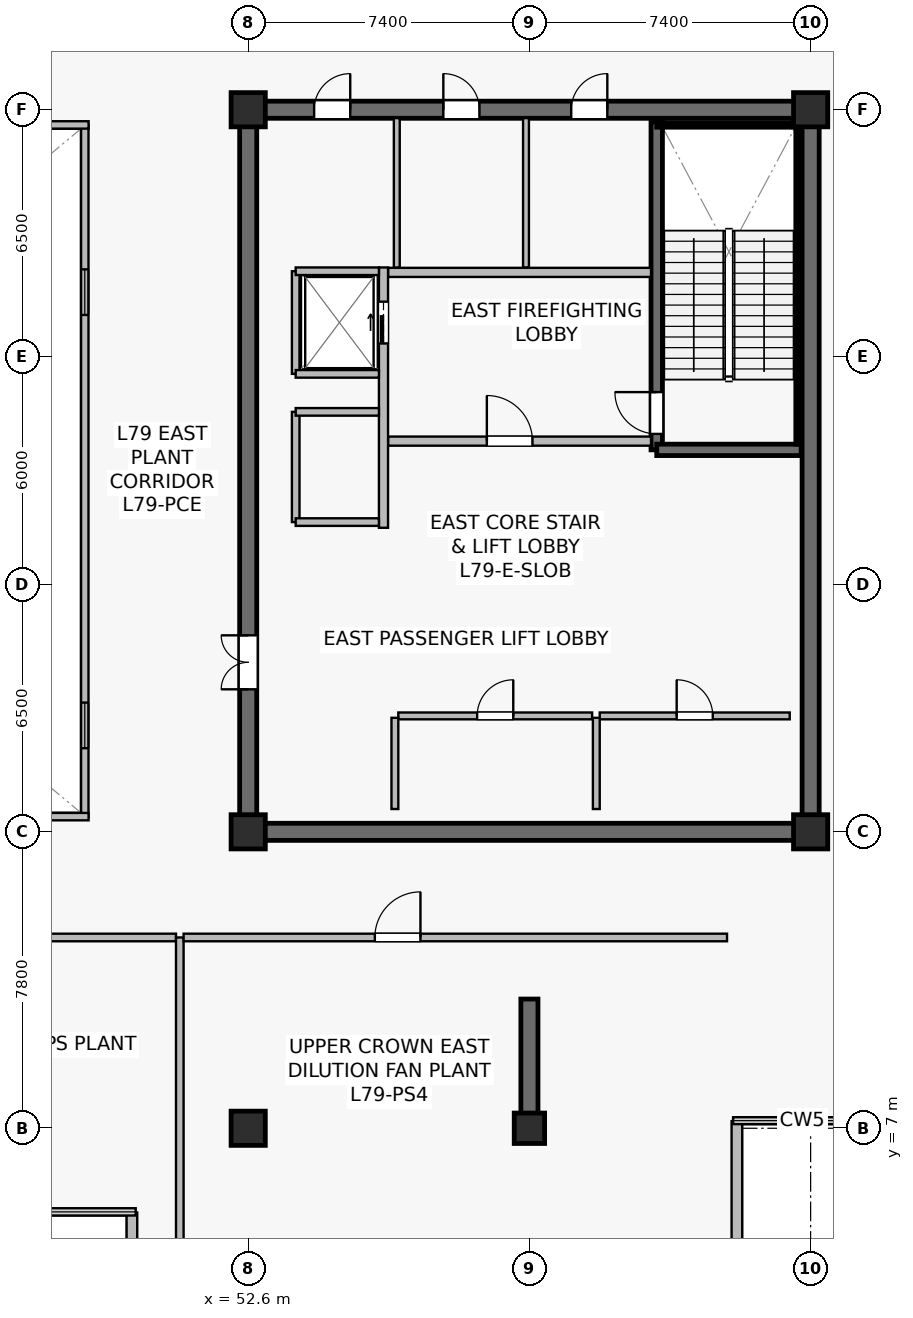
"""IFC4 building model, lengths in metres.
Left out: names, types, materials, properties, quantities, classifications, styles, units other than length and angle.
Written with IfcOpenShell. Run it as: python <this file> out.ifc"""

import sys

from ifc_helpers import new_model, si_unit, direction, frame, frame_2d, origin, origin_2d, place, context, subcontext, project, spatial, rectangle, extrude, source, transform, mapped, element, fill, save


model = new_model("IFC4")
c1 = context("Model", 3, precision=1e-05, world=origin(), true_north=direction((0.0, 1.0)))
c2 = subcontext(c1, "Body", "Model", "MODEL_VIEW")
j1 = project(units=[si_unit("LENGTHUNIT", "METRE"), si_unit("PLANEANGLEUNIT", "RADIAN")], contexts=[c1])
p1 = place(None, origin())
s1 = spatial("IfcSite", under=j1, at=p1, CompositionType="ELEMENT")
p2 = place(p1, origin())
s2 = spatial("IfcBuilding", under=s1, at=p2, CompositionType="ELEMENT")
p3 = place(p2, frame((0.0, 0.0, 332.4)))
s3 = spatial("IfcBuildingStorey", under=s2, at=p3, CompositionType="ELEMENT", Elevation=332.4)
p4 = place(p3, frame((52.375, 14.8, 0.0), z_axis=(0.0, 0.0, 1.0), x_axis=(1.0, 0.0, 0.0)))
e1 = element("IfcWall", 1, at=p4, inside=s3, PredefinedType="SHEAR", context=c2, shape_type="SweptSolid", body=[
    extrude(rectangle(XDim=15.25, YDim=0.45, at=frame_2d((7.625, 0.0))), origin(), (0.0, 0.0, 1.0), 5.12),
])
p5 = place(p3, frame((52.375, 33.8, 0.0), z_axis=(0.0, 0.0, 1.0), x_axis=(1.0, 0.0, 0.0)))
e2 = element("IfcWall", 2, at=p5, inside=s3, PredefinedType="SHEAR", context=c2, shape_type="SweptSolid", body=[
    extrude(rectangle(XDim=15.25, YDim=0.45, at=frame_2d((7.625, 0.0))), origin(), (0.0, 0.0, 1.0), 5.12),
])
p6 = place(p5, frame((8.725, 0.0, 0.0)))
e3 = element("IfcOpeningElement", 3, at=p6, cuts=e2, PredefinedType="OPENING", context=c2, shape_type="SweptSolid", body=[
    extrude(rectangle(XDim=0.95, YDim=2.15, at=frame_2d((0.475, 1.075))), frame((0.0, 0.235, 0.0), z_axis=(0.0, -1.0, 0.0), x_axis=(1.0, 0.0, 0.0)), (0.0, 0.0, 1.0), 0.47),
])
p7 = place(p5, frame((5.36, 0.0, 0.0)))
e4 = element("IfcOpeningElement", 4, at=p7, cuts=e2, PredefinedType="OPENING", context=c2, shape_type="SweptSolid", body=[
    extrude(rectangle(XDim=0.95, YDim=2.15, at=frame_2d((0.475, 1.075))), frame((0.0, 0.235, 0.0), z_axis=(0.0, -1.0, 0.0), x_axis=(1.0, 0.0, 0.0)), (0.0, 0.0, 1.0), 0.47),
])
p8 = place(p5, frame((1.96, 0.0, 0.0)))
e5 = element("IfcOpeningElement", 5, at=p8, cuts=e2, PredefinedType="OPENING", context=c2, shape_type="SweptSolid", body=[
    extrude(rectangle(XDim=0.95, YDim=2.15, at=frame_2d((0.475, 1.075))), frame((0.0, 0.235, 0.0), z_axis=(0.0, -1.0, 0.0), x_axis=(1.0, 0.0, 0.0)), (0.0, 0.0, 1.0), 0.47),
])
p9 = place(p3, frame((52.6, 15.025, 0.0), z_axis=(0.0, 0.0, 1.0), x_axis=(0.0, 1.0, 0.0)))
e6 = element("IfcWall", 6, at=p9, inside=s3, PredefinedType="SHEAR", context=c2, shape_type="SweptSolid", body=[
    extrude(rectangle(XDim=18.55, YDim=0.45, at=frame_2d((9.275, 0.0))), origin(), (0.0, 0.0, 1.0), 5.12),
])
p10 = place(p9, frame((3.525, 0.0, 0.0)))
e7 = element("IfcOpeningElement", 7, at=p10, cuts=e6, PredefinedType="OPENING", context=c2, shape_type="SweptSolid", body=[
    extrude(rectangle(XDim=1.42, YDim=2.2, at=frame_2d((0.71, 1.1))), frame((0.0, 0.235, 0.0), z_axis=(0.0, -1.0, 0.0), x_axis=(1.0, 0.0, 0.0)), (0.0, 0.0, 1.0), 0.47),
])
p11 = place(p3, frame((67.4, 15.025, 0.0), z_axis=(0.0, 0.0, 1.0), x_axis=(0.0, 1.0, 0.0)))
e8 = element("IfcWall", 8, at=p11, inside=s3, PredefinedType="SHEAR", context=c2, shape_type="SweptSolid", body=[
    extrude(rectangle(XDim=18.55, YDim=0.45, at=frame_2d((9.275, 0.0))), origin(), (0.0, 0.0, 1.0), 5.12),
])
p12 = place(p3, frame((63.35, 24.85, 0.0), z_axis=(0.0, 0.0, 1.0), x_axis=(0.0, 1.0, 0.0)))
e9 = element("IfcWall", 9, at=p12, inside=s3, PredefinedType="SHEAR", context=c2, shape_type="SweptSolid", body=[
    extrude(rectangle(XDim=8.63, YDim=0.3, at=frame_2d((4.315, 0.0))), origin(), (0.0, 0.0, 1.0), 5.12),
])
p13 = place(p12, frame((0.42, 0.0, 0.0)))
e10 = element("IfcOpeningElement", 10, at=p13, cuts=e9, PredefinedType="OPENING", context=c2, shape_type="SweptSolid", body=[
    extrude(rectangle(XDim=1.1, YDim=2.15, at=frame_2d((0.55, 1.075))), frame((0.0, 0.16, 0.0), z_axis=(0.0, -1.0, 0.0), x_axis=(1.0, 0.0, 0.0)), (0.0, 0.0, 1.0), 0.32),
])
p14 = place(p3, frame((63.35, 24.85, 0.0), z_axis=(0.0, 0.0, 1.0), x_axis=(1.0, 0.0, 0.0)))
e11 = element("IfcWall", 11, at=p14, inside=s3, PredefinedType="SHEAR", context=c2, shape_type="SweptSolid", body=[
    extrude(rectangle(XDim=3.8, YDim=0.3, at=frame_2d((1.9, 0.0))), origin(), (0.0, 0.0, 1.0), 5.12),
])
p15 = place(p3, frame((63.35, 33.4, 0.0), z_axis=(0.0, 0.0, 1.0), x_axis=(1.0, 0.0, 0.0)))
e12 = element("IfcWall", 12, at=p15, inside=s3, PredefinedType="SOLIDWALL", context=c2, shape_type="SweptSolid", body=[
    extrude(rectangle(XDim=3.72, YDim=0.12, at=frame_2d((1.86, 0.0))), origin(), (0.0, 0.0, 1.0), 5.12),
])
p16 = place(p3, frame((67.07, 25.0, 0.0), z_axis=(0.0, 0.0, 1.0), x_axis=(0.0, 1.0, 0.0)))
e13 = element("IfcWall", 13, at=p16, inside=s3, PredefinedType="SOLIDWALL", context=c2, shape_type="SweptSolid", body=[
    extrude(rectangle(XDim=8.32, YDim=0.12, at=frame_2d((4.16, 0.0))), origin(), (0.0, 0.0, 1.0), 5.12),
])
p17 = place(p3, frame((60.0, 7.3, 0.0), z_axis=(0.0, 0.0, 1.0), x_axis=(0.0, 1.0, 0.0)))
e14 = element("IfcWall", 14, at=p17, inside=s3, PredefinedType="SHEAR", context=c2, shape_type="SweptSolid", body=[
    extrude(rectangle(XDim=3.1, YDim=0.45, at=frame_2d((1.55, 0.0))), origin(), (0.0, 0.0, 1.0), 5.12),
])
m1 = source(origin(), c2, "Body", "SweptSolid", [
    extrude(rectangle(XDim=0.9, YDim=0.9, at=origin_2d()), origin(), (0.0, 0.0, 1.0), 5.4),
])
p18 = place(p3, frame((52.6, 7.0, 0.0), z_axis=(0.0, 0.0, 1.0), x_axis=(1.0, 0.0, 0.0)))
e15 = element("IfcColumn", 15, at=p18, inside=s3, PredefinedType="COLUMN", context=c2, shape_type="MappedRepresentation", body=[
    mapped(m1, transform((0.0, 0.0, 0.0), scale=1.0)),
])
m2 = source(origin(), c2, "Body", "SweptSolid", [
    extrude(rectangle(XDim=0.8, YDim=0.8, at=origin_2d()), origin(), (0.0, 0.0, 1.0), 5.4),
])
p19 = place(p3, frame((60.0, 7.0, 0.0), z_axis=(0.0, 0.0, 1.0), x_axis=(1.0, 0.0, 0.0)))
e16 = element("IfcColumn", 16, at=p19, inside=s3, PredefinedType="COLUMN", context=c2, shape_type="MappedRepresentation", body=[
    mapped(m2, transform((0.0, 0.0, 0.0), scale=1.0)),
])
for number, where, z_axis, x_axis in (
    (17, (52.6, 14.8, 0.0), (0.0, 0.0, 1.0), (1.0, 0.0, 0.0)),
    (18, (67.4, 14.8, 0.0), (0.0, 0.0, 1.0), (1.0, 0.0, 0.0)),
    (19, (52.6, 33.8, 0.0), (0.0, 0.0, 1.0), (1.0, 0.0, 0.0)),
    (20, (67.4, 33.8, 0.0), (0.0, 0.0, 1.0), (1.0, 0.0, 0.0)),
):
    element("IfcColumn", number, at=place(p3, frame(where, z_axis=z_axis, x_axis=x_axis)), inside=s3, PredefinedType="COLUMN", context=c2, shape_type="MappedRepresentation", body=[
        mapped(m1, transform((0.0, 0.0, 0.0), scale=1.0)),
    ])
p20 = place(p3, frame((49.54, 4.783, 0.0), z_axis=(0.0, 0.0, 1.0), x_axis=(0.0, -1.0, 0.0)))
e21 = element("IfcWall", 21, at=p20, inside=s3, PredefinedType="STANDARD", context=c2, shape_type="SweptSolid", body=[
    extrude(rectangle(XDim=1.083, YDim=0.28, at=frame_2d((0.542, 0.0))), origin(), (0.0, 0.0, 1.0), 5.12),
])
p21 = place(p3, frame((65.46, 3.7, 0.0), z_axis=(0.0, 0.0, 1.0), x_axis=(0.0, 1.0, 0.0)))
e22 = element("IfcWall", 22, at=p21, inside=s3, PredefinedType="STANDARD", context=c2, shape_type="SweptSolid", body=[
    extrude(rectangle(XDim=3.488, YDim=0.28, at=frame_2d((1.744, 0.0))), origin(), (0.0, 0.0, 1.0), 5.12),
])
p22 = place(p3, frame((56.28, 25.08, 0.0), z_axis=(0.0, 0.0, 1.0), x_axis=(1.0, 0.0, 0.0)))
e23 = element("IfcWall", 23, at=p22, inside=s3, PredefinedType="SOLIDWALL", context=c2, shape_type="SweptSolid", body=[
    extrude(rectangle(XDim=6.92, YDim=0.24, at=frame_2d((3.46, 0.0))), origin(), (0.0, 0.0, 1.0), 4.355),
])
p23 = place(p22, frame((2.6, 0.0, 0.0)))
e24 = element("IfcOpeningElement", 24, at=p23, cuts=e23, PredefinedType="OPENING", context=c2, shape_type="SweptSolid", body=[
    extrude(rectangle(XDim=1.2, YDim=2.16, at=frame_2d((0.6, 1.08))), frame((0.0, 0.13, 0.0), z_axis=(0.0, -1.0, 0.0), x_axis=(1.0, 0.0, 0.0)), (0.0, 0.0, 1.0), 0.26),
])
p24 = place(p3, frame((56.28, 29.52, 0.0), z_axis=(0.0, 0.0, 1.0), x_axis=(1.0, 0.0, 0.0)))
e25 = element("IfcWall", 25, at=p24, inside=s3, PredefinedType="SOLIDWALL", context=c2, shape_type="SweptSolid", body=[
    extrude(rectangle(XDim=6.92, YDim=0.24, at=frame_2d((3.46, 0.0))), origin(), (0.0, 0.0, 1.0), 4.355),
])
p25 = place(p3, frame((56.16, 22.8, 0.0), z_axis=(0.0, 0.0, 1.0), x_axis=(0.0, 1.0, 0.0)))
e26 = element("IfcWall", 26, at=p25, inside=s3, PredefinedType="SOLIDWALL", context=c2, shape_type="SweptSolid", body=[
    extrude(rectangle(XDim=6.85, YDim=0.24, at=frame_2d((3.425, 0.0))), origin(), (0.0, 0.0, 1.0), 4.255),
])
p26 = place(p25, frame((4.85, 0.0, 0.0)))
e27 = element("IfcOpeningElement", 27, at=p26, cuts=e26, PredefinedType="OPENING", context=c2, shape_type="SweptSolid", body=[
    extrude(rectangle(XDim=1.1, YDim=2.22, at=frame_2d((0.55, 1.11))), frame((0.0, 0.13, 0.0), z_axis=(0.0, -1.0, 0.0), x_axis=(1.0, 0.0, 0.0)), (0.0, 0.0, 1.0), 0.26),
])
p27 = place(p3, frame((53.85, 26.85, 0.0), z_axis=(0.0, 0.0, 1.0), x_axis=(0.0, 1.0, 0.0)))
e28 = element("IfcWall", 28, at=p27, inside=s3, PredefinedType="SOLIDWALL", context=c2, shape_type="SweptSolid", body=[
    extrude(rectangle(XDim=2.7, YDim=0.2, at=frame_2d((1.35, 0.0))), origin(), (0.0, 0.0, 1.0), 5.12),
])
p28 = place(p3, frame((53.85, 29.55, 0.0), z_axis=(0.0, 0.0, 1.0), x_axis=(1.0, 0.0, 0.0)))
e29 = element("IfcWall", 29, at=p28, inside=s3, PredefinedType="SOLIDWALL", context=c2, shape_type="SweptSolid", body=[
    extrude(rectangle(XDim=2.19, YDim=0.2, at=frame_2d((1.095, 0.0))), origin(), (0.0, 0.0, 1.0), 5.12),
])
p29 = place(p3, frame((53.85, 26.85, 0.0), z_axis=(0.0, 0.0, 1.0), x_axis=(1.0, 0.0, 0.0)))
e30 = element("IfcWall", 30, at=p29, inside=s3, PredefinedType="SOLIDWALL", context=c2, shape_type="SweptSolid", body=[
    extrude(rectangle(XDim=2.19, YDim=0.2, at=frame_2d((1.095, 0.0))), origin(), (0.0, 0.0, 1.0), 4.517),
])
p30 = place(p3, frame((53.85, 22.95, 0.0), z_axis=(0.0, 0.0, 1.0), x_axis=(0.0, 1.0, 0.0)))
e31 = element("IfcWall", 31, at=p30, inside=s3, PredefinedType="SOLIDWALL", context=c2, shape_type="SweptSolid", body=[
    extrude(rectangle(XDim=2.9, YDim=0.2, at=frame_2d((1.45, 0.0))), origin(), (0.0, 0.0, 1.0), 4.255),
])
for number, where, z_axis, x_axis in (
    (32, (53.85, 25.85, 0.0), (0.0, 0.0, 1.0), (1.0, 0.0, 0.0)),
    (33, (53.85, 22.95, 0.0), (0.0, 0.0, 1.0), (1.0, 0.0, 0.0)),
):
    element("IfcWall", number, at=place(p3, frame(where, z_axis=z_axis, x_axis=x_axis)), inside=s3, PredefinedType="SOLIDWALL", context=c2, shape_type="SweptSolid", body=[
        extrude(rectangle(XDim=2.19, YDim=0.2, at=frame_2d((1.095, 0.0))), origin(), (0.0, 0.0, 1.0), 5.12),
    ])
p31 = place(p3, frame((61.85, 17.85, 0.0), z_axis=(0.0, 0.0, 1.0), x_axis=(1.0, 0.0, 0.0)))
e34 = element("IfcWall", 34, at=p31, inside=s3, PredefinedType="SOLIDWALL", context=c2, shape_type="SweptSolid", body=[
    extrude(rectangle(XDim=5.0, YDim=0.18, at=frame_2d((2.5, 0.0))), origin(), (0.0, 0.0, 1.0), 5.12),
])
p32 = place(p31, frame((2.025, 0.0, 0.0)))
e35 = element("IfcOpeningElement", 35, at=p32, cuts=e34, PredefinedType="OPENING", context=c2, shape_type="SweptSolid", body=[
    extrude(rectangle(XDim=0.95, YDim=2.15, at=frame_2d((0.475, 1.075))), frame((0.0, 0.1, 0.0), z_axis=(0.0, -1.0, 0.0), x_axis=(1.0, 0.0, 0.0)), (0.0, 0.0, 1.0), 0.2),
])
p33 = place(p3, frame((61.76, 15.4, 0.0), z_axis=(0.0, 0.0, 1.0), x_axis=(0.0, 1.0, 0.0)))
e36 = element("IfcWall", 36, at=p33, inside=s3, PredefinedType="SOLIDWALL", context=c2, shape_type="SweptSolid", body=[
    extrude(rectangle(XDim=2.4, YDim=0.18, at=frame_2d((1.2, 0.0))), origin(), (0.0, 0.0, 1.0), 5.12),
])
p34 = place(p3, frame((56.55, 17.85, 0.0), z_axis=(0.0, 0.0, 1.0), x_axis=(1.0, 0.0, 0.0)))
e37 = element("IfcWall", 37, at=p34, inside=s3, PredefinedType="SOLIDWALL", context=c2, shape_type="SweptSolid", body=[
    extrude(rectangle(XDim=5.1, YDim=0.18, at=frame_2d((2.55, 0.0))), origin(), (0.0, 0.0, 1.0), 4.355),
])
p35 = place(p34, frame((2.075, 0.0, 0.0)))
e38 = element("IfcOpeningElement", 38, at=p35, cuts=e37, PredefinedType="OPENING", context=c2, shape_type="SweptSolid", body=[
    extrude(rectangle(XDim=0.95, YDim=2.15, at=frame_2d((0.475, 1.075))), frame((0.0, 0.1, 0.0), z_axis=(0.0, -1.0, 0.0), x_axis=(1.0, 0.0, 0.0)), (0.0, 0.0, 1.0), 0.2),
])
p36 = place(p3, frame((56.46, 15.4, 0.0), z_axis=(0.0, 0.0, 1.0), x_axis=(0.0, 1.0, 0.0)))
e39 = element("IfcWall", 39, at=p36, inside=s3, PredefinedType="SOLIDWALL", context=c2, shape_type="SweptSolid", body=[
    extrude(rectangle(XDim=2.4, YDim=0.18, at=frame_2d((1.2, 0.0))), origin(), (0.0, 0.0, 1.0), 5.12),
])
p37 = place(p3, frame((59.91, 29.65, 0.0), z_axis=(0.0, 0.0, 1.0), x_axis=(0.0, 1.0, 0.0)))
e40 = element("IfcWall", 40, at=p37, inside=s3, PredefinedType="PLUMBINGWALL", context=c2, shape_type="SweptSolid", body=[
    extrude(rectangle(XDim=3.93, YDim=0.155, at=frame_2d((1.965, 0.0))), origin(), (0.0, 0.0, 1.0), 4.355),
])
p38 = place(p3, frame((56.51, 29.65, 0.0), z_axis=(0.0, 0.0, 1.0), x_axis=(0.0, 1.0, 0.0)))
e41 = element("IfcWall", 41, at=p38, inside=s3, PredefinedType="PLUMBINGWALL", context=c2, shape_type="SweptSolid", body=[
    extrude(rectangle(XDim=3.93, YDim=0.155, at=frame_2d((1.965, 0.0))), origin(), (0.0, 0.0, 1.0), 5.12),
])
p39 = place(p3, frame((48.3, 15.2, 0.0), z_axis=(0.0, 0.0, 1.0), x_axis=(0.0, 1.0, 0.0)))
e42 = element("IfcWall", 42, at=p39, inside=s3, PredefinedType="SOLIDWALL", context=c2, shape_type="SweptSolid", body=[
    extrude(rectangle(XDim=18.2, YDim=0.195, at=frame_2d((9.1, 0.0))), origin(), (0.0, 0.0, 1.0), 5.12),
])
p40 = place(p39, frame((1.8, 0.0, 0.9)))
e43 = element("IfcOpeningElement", 43, at=p40, cuts=e42, PredefinedType="OPENING", context=c2, shape_type="SweptSolid", body=[
    extrude(rectangle(XDim=1.2, YDim=1.35, at=frame_2d((0.6, 0.675))), frame((0.0, 0.107, 0.0), z_axis=(0.0, -1.0, 0.0), x_axis=(1.0, 0.0, 0.0)), (0.0, 0.0, 1.0), 0.215),
])
p41 = place(p39, frame((13.2, 0.0, 0.9)))
e44 = element("IfcOpeningElement", 44, at=p41, cuts=e42, PredefinedType="OPENING", context=c2, shape_type="SweptSolid", body=[
    extrude(rectangle(XDim=1.2, YDim=1.35, at=frame_2d((0.6, 0.675))), frame((0.0, 0.107, 0.0), z_axis=(0.0, -1.0, 0.0), x_axis=(1.0, 0.0, 0.0)), (0.0, 0.0, 1.0), 0.215),
])
for number, where, z_axis, x_axis in (
    (45, (26.4, 15.2, 0.0), (0.0, 0.0, 1.0), (1.0, 0.0, 0.0)),
    (46, (26.4, 33.4, 0.0), (0.0, 0.0, 1.0), (1.0, 0.0, 0.0)),
):
    element("IfcWall", number, at=place(p3, frame(where, z_axis=z_axis, x_axis=x_axis)), inside=s3, PredefinedType="SOLIDWALL", context=c2, shape_type="SweptSolid", body=[
        extrude(rectangle(XDim=22.0, YDim=0.195, at=frame_2d((11.0, 0.0))), origin(), (0.0, 0.0, 1.0), 5.12),
    ])
p42 = place(p3, frame((39.1, 12.02, 0.0), z_axis=(0.0, 0.0, 1.0), x_axis=(1.0, 0.0, 0.0)))
e47 = element("IfcWall", 47, at=p42, inside=s3, PredefinedType="SOLIDWALL", context=c2, shape_type="SweptSolid", body=[
    extrude(rectangle(XDim=11.6, YDim=0.2, at=frame_2d((5.8, 0.0))), origin(), (0.0, 0.0, 1.0), 4.355),
])
p43 = place(p42, frame((5.2, 0.0, 0.0)))
e48 = element("IfcOpeningElement", 48, at=p43, cuts=e47, PredefinedType="OPENING", context=c2, shape_type="SweptSolid", body=[
    extrude(rectangle(XDim=1.2, YDim=2.16, at=frame_2d((0.6, 1.08))), frame((0.0, 0.11, 0.0), z_axis=(0.0, -1.0, 0.0), x_axis=(1.0, 0.0, 0.0)), (0.0, 0.0, 1.0), 0.22),
])
p44 = place(p3, frame((50.8, 3.81, 0.0), z_axis=(0.0, 0.0, 1.0), x_axis=(0.0, 1.0, 0.0)))
e49 = element("IfcWall", 49, at=p44, inside=s3, PredefinedType="SOLIDWALL", context=c2, shape_type="SweptSolid", body=[
    extrude(rectangle(XDim=8.21, YDim=0.2, at=frame_2d((4.105, 0.0))), origin(), (0.0, 0.0, 1.0), 4.455),
])
p45 = place(p3, frame((50.9, 12.02, 0.0), z_axis=(0.0, 0.0, 1.0), x_axis=(1.0, 0.0, 0.0)))
e50 = element("IfcWall", 50, at=p45, inside=s3, PredefinedType="SOLIDWALL", context=c2, shape_type="SweptSolid", body=[
    extrude(rectangle(XDim=14.3, YDim=0.2, at=frame_2d((7.15, 0.0))), origin(), (0.0, 0.0, 1.0), 4.355),
])
p46 = place(p45, frame((5.032, 0.0, 0.0)))
e51 = element("IfcOpeningElement", 51, at=p46, cuts=e50, PredefinedType="OPENING", context=c2, shape_type="SweptSolid", body=[
    extrude(rectangle(XDim=1.2, YDim=2.16, at=frame_2d((0.6, 1.08))), frame((0.0, 0.11, 0.0), z_axis=(0.0, -1.0, 0.0), x_axis=(1.0, 0.0, 0.0)), (0.0, 0.0, 1.0), 0.22),
])
m3 = source(origin(), c2, "Body", "SweptSolid", [
    extrude(rectangle(XDim=1.2, YDim=1.35, at=frame_2d((0.6, 0.675))), frame((0.0, 0.03, 0.0), z_axis=(0.0, -1.0, 0.0), x_axis=(1.0, 0.0, 0.0)), (0.0, 0.0, 1.0), 0.06),
])
p47 = place(p40, origin())
e52 = element("IfcWindow", 52, at=p47, inside=s3, PartitioningType="SINGLE_PANEL", PredefinedType="WINDOW", context=c2, shape_type="MappedRepresentation", body=[
    mapped(m3, transform((0.0, 0.0, 0.0), scale=1.0)),
])
fill(e43, e52)
p48 = place(p41, origin())
e53 = element("IfcWindow", 53, at=p48, inside=s3, PartitioningType="SINGLE_PANEL", PredefinedType="WINDOW", context=c2, shape_type="MappedRepresentation", body=[
    mapped(m3, transform((0.0, 0.0, 0.0), scale=1.0)),
])
fill(e44, e53)
m4 = source(origin(), c2, "Body", "SweptSolid", [
    extrude(rectangle(XDim=1.1, YDim=2.15, at=frame_2d((0.55, 1.075))), frame((0.0, 0.025, 0.0), z_axis=(0.0, -1.0, 0.0), x_axis=(1.0, 0.0, 0.0)), (0.0, 0.0, 1.0), 0.05),
])
p49 = place(p13, origin())
e54 = element("IfcDoor", 54, at=p49, inside=s3, OperationType="SINGLE_SWING_RIGHT", PredefinedType="DOOR", context=c2, shape_type="MappedRepresentation", body=[
    mapped(m4, transform((0.0, 0.0, 0.0), scale=1.0)),
])
fill(e10, e54)
m5 = source(origin(), c2, "Body", "SweptSolid", [
    extrude(rectangle(XDim=1.2, YDim=2.16, at=frame_2d((0.6, 1.08))), frame((0.0, 0.025, 0.0), z_axis=(0.0, -1.0, 0.0), x_axis=(1.0, 0.0, 0.0)), (0.0, 0.0, 1.0), 0.05),
])
p50 = place(p23, origin())
e55 = element("IfcDoor", 55, at=p50, inside=s3, OperationType="SINGLE_SWING_LEFT", PredefinedType="DOOR", context=c2, shape_type="MappedRepresentation", body=[
    mapped(m5, transform((0.0, 0.0, 0.0), scale=1.0)),
])
fill(e24, e55)
m6 = source(origin(), c2, "Body", "SweptSolid", [
    extrude(rectangle(XDim=1.1, YDim=2.22, at=frame_2d((0.55, 1.11))), frame((0.0, 0.025, 0.0), z_axis=(0.0, -1.0, 0.0), x_axis=(1.0, 0.0, 0.0)), (0.0, 0.0, 1.0), 0.05),
])
p51 = place(p26, origin())
e56 = element("IfcDoor", 56, at=p51, inside=s3, OperationType="SLIDING_TO_RIGHT", PredefinedType="USERDEFINED", context=c2, shape_type="MappedRepresentation", body=[
    mapped(m6, transform((0.0, 0.0, 0.0), scale=1.0)),
])
fill(e27, e56)
m7 = source(origin(), c2, "Body", "SweptSolid", [
    extrude(rectangle(XDim=0.95, YDim=2.15, at=frame_2d((0.475, 1.075))), frame((0.0, 0.025, 0.0), z_axis=(0.0, -1.0, 0.0), x_axis=(1.0, 0.0, 0.0)), (0.0, 0.0, 1.0), 0.05),
])
p52 = place(p32, origin())
e57 = element("IfcDoor", 57, at=p52, inside=s3, OperationType="SINGLE_SWING_LEFT", PredefinedType="DOOR", context=c2, shape_type="MappedRepresentation", body=[
    mapped(m7, transform((0.0, 0.0, 0.0), scale=1.0)),
])
fill(e35, e57)
p53 = place(p35, origin())
e58 = element("IfcDoor", 58, at=p53, inside=s3, OperationType="SINGLE_SWING_RIGHT", PredefinedType="DOOR", context=c2, shape_type="MappedRepresentation", body=[
    mapped(m7, transform((0.0, 0.0, 0.0), scale=1.0)),
])
fill(e38, e58)
m8 = source(origin(), c2, "Body", "SweptSolid", [
    extrude(rectangle(XDim=1.42, YDim=2.2, at=frame_2d((0.71, 1.1))), frame((0.0, 0.025, 0.0), z_axis=(0.0, -1.0, 0.0), x_axis=(1.0, 0.0, 0.0)), (0.0, 0.0, 1.0), 0.05),
])
p54 = place(p10, origin())
e59 = element("IfcDoor", 59, at=p54, inside=s3, OperationType="DOUBLE_DOOR_SINGLE_SWING", PredefinedType="DOOR", context=c2, shape_type="MappedRepresentation", body=[
    mapped(m8, transform((0.0, 0.0, 0.0), scale=1.0)),
])
fill(e7, e59)
p55 = place(p6, origin())
e60 = element("IfcDoor", 60, at=p55, inside=s3, OperationType="SINGLE_SWING_RIGHT", PredefinedType="DOOR", context=c2, shape_type="MappedRepresentation", body=[
    mapped(m7, transform((0.0, 0.0, 0.0), scale=1.0)),
])
fill(e3, e60)
p56 = place(p7, origin())
e61 = element("IfcDoor", 61, at=p56, inside=s3, OperationType="SINGLE_SWING_LEFT", PredefinedType="DOOR", context=c2, shape_type="MappedRepresentation", body=[
    mapped(m7, transform((0.0, 0.0, 0.0), scale=1.0)),
])
fill(e4, e61)
p57 = place(p8, origin())
e62 = element("IfcDoor", 62, at=p57, inside=s3, OperationType="SINGLE_SWING_RIGHT", PredefinedType="DOOR", context=c2, shape_type="MappedRepresentation", body=[
    mapped(m7, transform((0.0, 0.0, 0.0), scale=1.0)),
])
fill(e5, e62)
p58 = place(p46, origin())
e63 = element("IfcDoor", 63, at=p58, inside=s3, OperationType="SINGLE_SWING_RIGHT", PredefinedType="DOOR", context=c2, shape_type="MappedRepresentation", body=[
    mapped(m5, transform((0.0, 0.0, 0.0), scale=1.0)),
])
fill(e51, e63)
save(model, sys.argv[1])
